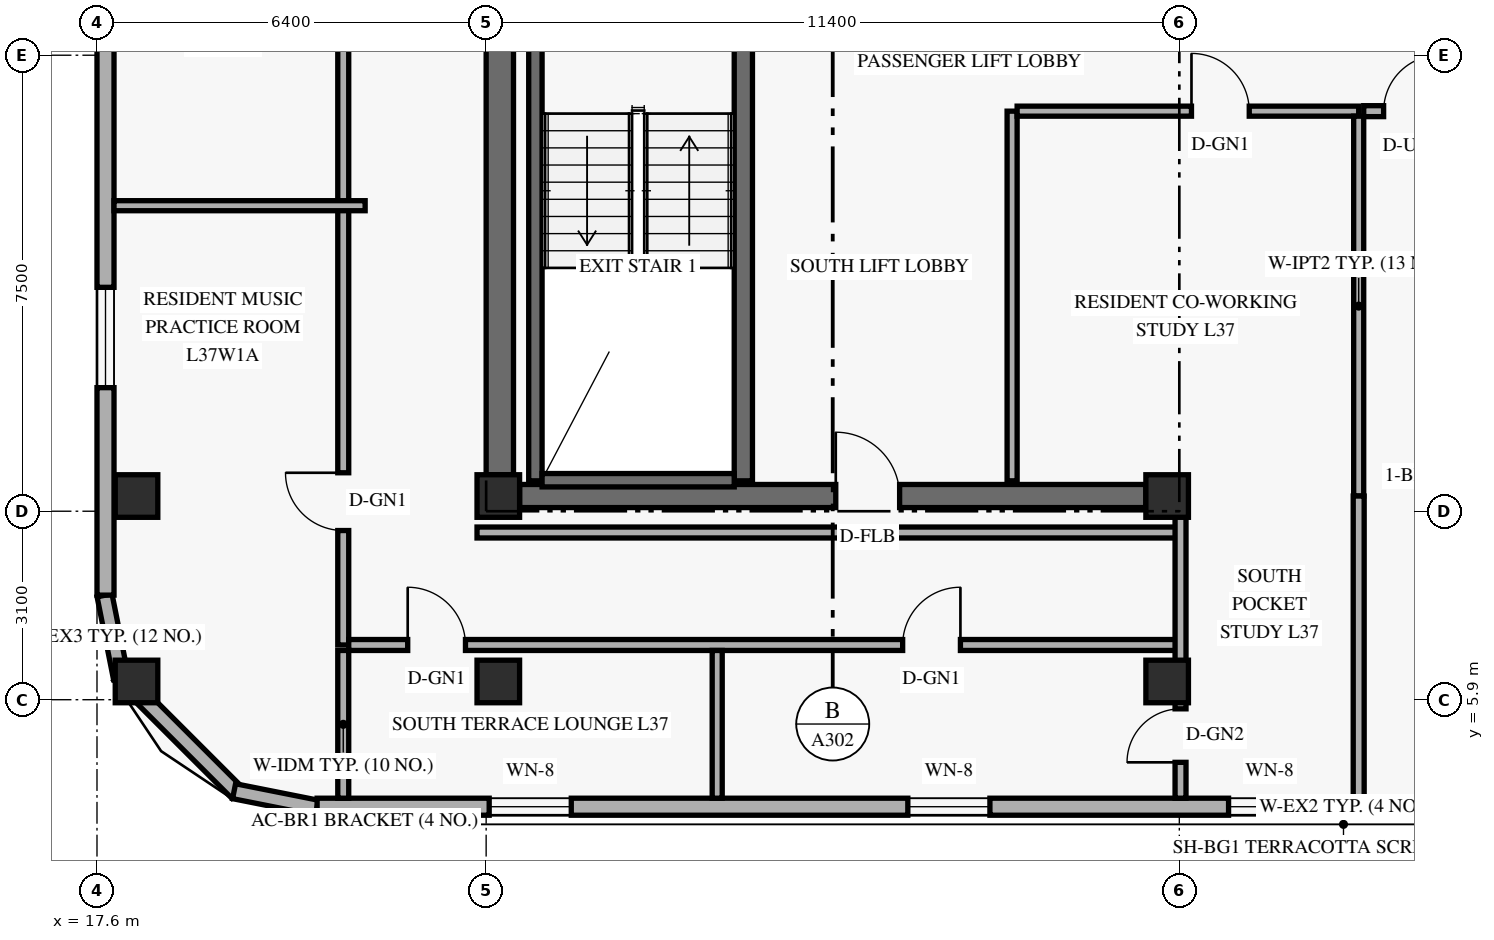
"""IFC4 building model, lengths in metres.
Left out: names, types, materials, properties, quantities, classifications, styles, units other than length and angle.
Written with IfcOpenShell. Run it as: python <this file> out.ifc"""

import sys

from ifc_helpers import new_model, si_unit, direction, frame, frame_2d, origin, origin_2d, place, context, subcontext, project, spatial, rectangle, extrude, element, fill, save


model = new_model("IFC4")
c1 = context("Model", 3, precision=1e-05, world=origin(), true_north=direction((0.0, 1.0)))
c2 = subcontext(c1, "Body", "Model", "MODEL_VIEW")
j1 = project(units=[si_unit("LENGTHUNIT", "METRE"), si_unit("PLANEANGLEUNIT", "RADIAN")], contexts=[c1])
p1 = place(None, origin())
s1 = spatial("IfcSite", under=j1, at=p1, CompositionType="ELEMENT")
p2 = place(p1, origin())
s2 = spatial("IfcBuilding", under=s1, at=p2, CompositionType="ELEMENT")
p3 = place(p2, frame((0.0, 0.0, 144.6)))
s3 = spatial("IfcBuildingStorey", under=s2, at=p3, CompositionType="ELEMENT", Elevation=144.6)
p4 = place(p3, frame((24.225, 9.6, 0.0), z_axis=(0.0, 0.0, 1.0), x_axis=(0.0, 1.0, 0.0)))
e1 = element("IfcWall", 1, at=p4, inside=s3, PredefinedType="SHEAR", context=c2, shape_type="SweptSolid", body=[
    extrude(rectangle(XDim=7.6, YDim=0.45, at=frame_2d((3.8, 0.0))), origin(), (0.0, 0.0, 1.0), 2.748),
])
p5 = place(p3, frame((24.55, 9.25, 0.0), z_axis=(0.0, 0.0, 1.0), x_axis=(1.0, 0.0, 0.0)))
e2 = element("IfcWall", 2, at=p5, inside=s3, PredefinedType="SHEAR", context=c2, shape_type="SweptSolid", body=[
    extrude(rectangle(XDim=10.3, YDim=0.38, at=frame_2d((5.15, 0.0))), origin(), (0.0, 0.0, 1.0), 3.36),
])
p6 = place(p5, frame((5.2, 0.0, 0.0)))
e3 = element("IfcOpeningElement", 3, at=p6, cuts=e2, PredefinedType="OPENING", context=c2, shape_type="SweptSolid", body=[
    extrude(rectangle(XDim=1.05, YDim=2.15, at=frame_2d((0.525, 1.075))), frame((0.0, 0.2, 0.0), z_axis=(0.0, -1.0, 0.0), x_axis=(1.0, 0.0, 0.0)), (0.0, 0.0, 1.0), 0.4),
])
p7 = place(p3, frame((24.81, 9.5, 0.0), z_axis=(0.0, 0.0, 1.0), x_axis=(0.0, 1.0, 0.0)))
e4 = element("IfcWall", 4, at=p7, inside=s3, PredefinedType="SHEAR", context=c2, shape_type="SweptSolid", body=[
    extrude(rectangle(XDim=7.76, YDim=0.22, at=frame_2d((3.88, 0.0))), origin(), (0.0, 0.0, 1.0), 3.36),
])
p8 = place(p3, frame((28.23, 9.5, 0.0), z_axis=(0.0, 0.0, 1.0), x_axis=(0.0, 1.0, 0.0)))
e5 = element("IfcWall", 5, at=p8, inside=s3, PredefinedType="SHEAR", context=c2, shape_type="SweptSolid", body=[
    extrude(rectangle(XDim=7.76, YDim=0.3, at=frame_2d((3.88, 0.0))), origin(), (0.0, 0.0, 1.0), 3.36),
])
p9 = place(p3, frame((24.92, 9.51, 0.0), z_axis=(0.0, 0.0, 1.0), x_axis=(1.0, 0.0, 0.0)))
e6 = element("IfcWall", 6, at=p9, inside=s3, PredefinedType="SHEAR", context=c2, shape_type="SweptSolid", body=[
    extrude(rectangle(XDim=3.16, YDim=0.22, at=frame_2d((1.58, 0.0))), origin(), (0.0, 0.0, 1.0), 3.36),
])
for number, where, z_axis, x_axis in (
    (7, (18.25, 6.2, 0.0), (0.0, 0.0, 1.0), (1.0, 0.0, 0.0)),
    (8, (18.25, 9.25, 0.0), (0.0, 0.0, 1.0), (1.0, 0.0, 0.0)),
    (9, (24.2, 6.2, 0.0), (0.0, 0.0, 1.0), (1.0, 0.0, 0.0)),
    (10, (24.2, 9.25, 0.0), (0.0, 0.0, 1.0), (1.0, 0.0, 0.0)),
    (11, (35.2, 6.2, 0.0), (0.0, 0.0, 1.0), (1.0, 0.0, 0.0)),
    (12, (35.2, 9.25, 0.0), (0.0, 0.0, 1.0), (1.0, 0.0, 0.0)),
):
    element("IfcColumn", number, at=place(p3, frame(where, z_axis=z_axis, x_axis=x_axis)), inside=s3, PredefinedType="COLUMN", context=c2, shape_type="SweptSolid", body=[
        extrude(rectangle(XDim=0.7, YDim=0.7, at=origin_2d()), origin(), (0.0, 0.0, 1.0), 3.6),
    ])
p10 = place(p3, frame((17.724, 7.616, 0.0), z_axis=(0.0, 0.0, 1.0), x_axis=(0.195135625965, -0.9807762678, 0.0)))
e13 = element("IfcWall", 13, at=p10, inside=s3, PredefinedType="SOLIDWALL", context=c2, shape_type="SweptSolid", body=[
    extrude(rectangle(XDim=1.389, YDim=0.25, at=frame_2d((0.694, 0.0))), origin(), (0.0, 0.0, 1.0), 3.36),
])
p11 = place(p3, frame((17.968, 6.305, 0.0), z_axis=(0.0, 0.0, 1.0), x_axis=(0.707106781187, -0.707106781187, 0.0)))
e14 = element("IfcWall", 14, at=p11, inside=s3, PredefinedType="SOLIDWALL", context=c2, shape_type="SweptSolid", body=[
    extrude(rectangle(XDim=2.739, YDim=0.25, at=frame_2d((1.37, 0.0))), origin(), (0.0, 0.0, 1.0), 3.36),
])
p12 = place(p3, frame((19.854, 4.395, 0.0), z_axis=(0.0, 0.0, 1.0), x_axis=(0.980809899341, -0.19496651342, 0.0)))
e15 = element("IfcWall", 15, at=p12, inside=s3, PredefinedType="SOLIDWALL", context=c2, shape_type="SweptSolid", body=[
    extrude(rectangle(XDim=1.389, YDim=0.25, at=frame_2d((0.694, 0.0))), origin(), (0.0, 0.0, 1.0), 3.36),
])
p13 = place(p3, frame((21.22, 4.14, 0.0), z_axis=(0.0, 0.0, 1.0), x_axis=(1.0, 0.0, 0.0)))
e16 = element("IfcWall", 16, at=p13, inside=s3, PredefinedType="SOLIDWALL", context=c2, shape_type="SweptSolid", body=[
    extrude(rectangle(XDim=33.76, YDim=0.28, at=frame_2d((16.88, 0.0))), origin(), (0.0, 0.0, 1.0), 3.36),
])
p14 = place(p13, frame((2.83, 0.0, 0.85)))
e17 = element("IfcOpeningElement", 17, at=p14, cuts=e16, PredefinedType="OPENING", context=c2, shape_type="SweptSolid", body=[
    extrude(rectangle(XDim=1.35, YDim=1.55, at=frame_2d((0.675, 0.775))), frame((0.0, 0.15, 0.0), z_axis=(0.0, -1.0, 0.0), x_axis=(1.0, 0.0, 0.0)), (0.0, 0.0, 1.0), 0.3),
])
p15 = place(p13, frame((9.715, 0.0, 0.85)))
e18 = element("IfcOpeningElement", 18, at=p15, cuts=e16, PredefinedType="OPENING", context=c2, shape_type="SweptSolid", body=[
    extrude(rectangle(XDim=1.35, YDim=1.55, at=frame_2d((0.675, 0.775))), frame((0.0, 0.15, 0.0), z_axis=(0.0, -1.0, 0.0), x_axis=(1.0, 0.0, 0.0)), (0.0, 0.0, 1.0), 0.3),
])
p16 = place(p13, frame((14.99, 0.0, 0.85)))
e19 = element("IfcOpeningElement", 19, at=p16, cuts=e16, PredefinedType="OPENING", context=c2, shape_type="SweptSolid", body=[
    extrude(rectangle(XDim=1.35, YDim=1.55, at=frame_2d((0.675, 0.775))), frame((0.0, 0.15, 0.0), z_axis=(0.0, -1.0, 0.0), x_axis=(1.0, 0.0, 0.0)), (0.0, 0.0, 1.0), 0.3),
])
p17 = place(p13, frame((19.55, 0.0, 0.85)))
e20 = element("IfcOpeningElement", 20, at=p17, cuts=e16, PredefinedType="OPENING", context=c2, shape_type="SweptSolid", body=[
    extrude(rectangle(XDim=1.35, YDim=1.55, at=frame_2d((0.675, 0.775))), frame((0.0, 0.15, 0.0), z_axis=(0.0, -1.0, 0.0), x_axis=(1.0, 0.0, 0.0)), (0.0, 0.0, 1.0), 0.3),
])
p18 = place(p13, frame((24.375, 0.0, 0.85)))
e21 = element("IfcOpeningElement", 21, at=p18, cuts=e16, PredefinedType="OPENING", context=c2, shape_type="SweptSolid", body=[
    extrude(rectangle(XDim=1.35, YDim=1.55, at=frame_2d((0.675, 0.775))), frame((0.0, 0.15, 0.0), z_axis=(0.0, -1.0, 0.0), x_axis=(1.0, 0.0, 0.0)), (0.0, 0.0, 1.0), 0.3),
])
p19 = place(p13, frame((27.08, 0.0, 0.85)))
e22 = element("IfcOpeningElement", 22, at=p19, cuts=e16, PredefinedType="OPENING", context=c2, shape_type="SweptSolid", body=[
    extrude(rectangle(XDim=1.2, YDim=1.5, at=frame_2d((0.6, 0.75))), frame((0.0, 0.15, 0.0), z_axis=(0.0, -1.0, 0.0), x_axis=(1.0, 0.0, 0.0)), (0.0, 0.0, 1.0), 0.3),
])
p20 = place(p13, frame((30.495, 0.0, 0.85)))
e23 = element("IfcOpeningElement", 23, at=p20, cuts=e16, PredefinedType="OPENING", context=c2, shape_type="SweptSolid", body=[
    extrude(rectangle(XDim=1.35, YDim=1.55, at=frame_2d((0.675, 0.775))), frame((0.0, 0.15, 0.0), z_axis=(0.0, -1.0, 0.0), x_axis=(1.0, 0.0, 0.0)), (0.0, 0.0, 1.0), 0.3),
])
p21 = place(p3, frame((17.74, 40.38, 0.0), z_axis=(0.0, 0.0, 1.0), x_axis=(0.0, -1.0, 0.0)))
e24 = element("IfcWall", 24, at=p21, inside=s3, PredefinedType="SOLIDWALL", context=c2, shape_type="SweptSolid", body=[
    extrude(rectangle(XDim=32.76, YDim=0.28, at=frame_2d((16.38, 0.0))), origin(), (0.0, 0.0, 1.0), 3.36),
])
p22 = place(p21, frame((27.698, 0.0, 0.85)))
e25 = element("IfcOpeningElement", 25, at=p22, cuts=e24, PredefinedType="OPENING", context=c2, shape_type="SweptSolid", body=[
    extrude(rectangle(XDim=1.65, YDim=1.6, at=frame_2d((0.825, 0.8))), frame((0.0, 0.15, 0.0), z_axis=(0.0, -1.0, 0.0), x_axis=(1.0, 0.0, 0.0)), (0.0, 0.0, 1.0), 0.3),
])
p23 = place(p21, frame((18.16, 0.0, 0.85)))
e26 = element("IfcOpeningElement", 26, at=p23, cuts=e24, PredefinedType="OPENING", context=c2, shape_type="SweptSolid", body=[
    extrude(rectangle(XDim=1.65, YDim=1.6, at=frame_2d((0.825, 0.8))), frame((0.0, 0.15, 0.0), z_axis=(0.0, -1.0, 0.0), x_axis=(1.0, 0.0, 0.0)), (0.0, 0.0, 1.0), 0.3),
])
p24 = place(p21, frame((12.275, 0.0, 0.85)))
e27 = element("IfcOpeningElement", 27, at=p24, cuts=e24, PredefinedType="OPENING", context=c2, shape_type="SweptSolid", body=[
    extrude(rectangle(XDim=1.65, YDim=1.6, at=frame_2d((0.825, 0.8))), frame((0.0, 0.15, 0.0), z_axis=(0.0, -1.0, 0.0), x_axis=(1.0, 0.0, 0.0)), (0.0, 0.0, 1.0), 0.3),
])
p25 = place(p21, frame((3.238, 0.0, 0.85)))
e28 = element("IfcOpeningElement", 28, at=p25, cuts=e24, PredefinedType="OPENING", context=c2, shape_type="SweptSolid", body=[
    extrude(rectangle(XDim=1.65, YDim=1.6, at=frame_2d((0.825, 0.8))), frame((0.0, 0.15, 0.0), z_axis=(0.0, -1.0, 0.0), x_axis=(1.0, 0.0, 0.0)), (0.0, 0.0, 1.0), 0.3),
])
p26 = place(p3, frame((32.65, 9.5, 0.0), z_axis=(0.0, 0.0, 1.0), x_axis=(0.0, 1.0, 0.0)))
e29 = element("IfcWall", 29, at=p26, inside=s3, PredefinedType="PARTITIONING", context=c2, shape_type="SweptSolid", body=[
    extrude(rectangle(XDim=6.08, YDim=0.165, at=frame_2d((3.04, 0.0))), origin(), (0.0, 0.0, 1.0), 3.36),
])
p27 = place(p3, frame((32.732, 15.58, 0.0), z_axis=(0.0, 0.0, 1.0), x_axis=(1.0, 0.0, 0.0)))
e30 = element("IfcWall", 30, at=p27, inside=s3, PredefinedType="PARTITIONING", context=c2, shape_type="SweptSolid", body=[
    extrude(rectangle(XDim=5.618, YDim=0.165, at=frame_2d((2.809, 0.0))), origin(), (0.0, 0.0, 1.0), 2.73),
])
p28 = place(p27, frame((2.867, 0.0, 0.0)))
e31 = element("IfcOpeningElement", 31, at=p28, cuts=e30, PredefinedType="OPENING", context=c2, shape_type="SweptSolid", body=[
    extrude(rectangle(XDim=0.95, YDim=2.15, at=frame_2d((0.475, 1.075))), frame((0.0, 0.093, 0.0), z_axis=(0.0, -1.0, 0.0), x_axis=(1.0, 0.0, 0.0)), (0.0, 0.0, 1.0), 0.185),
])
p29 = place(p3, frame((38.35, 9.25, 0.0), z_axis=(0.0, 0.0, 1.0), x_axis=(0.0, 1.0, 0.0)))
e32 = element("IfcWall", 32, at=p29, inside=s3, PredefinedType="PARTITIONING", context=c2, shape_type="SweptSolid", body=[
    extrude(rectangle(XDim=6.248, YDim=0.165, at=frame_2d((3.124, 0.0))), origin(), (0.0, 0.0, 1.0), 2.73),
])
p30 = place(p3, frame((38.433, 15.58, 0.0), z_axis=(0.0, 0.0, 1.0), x_axis=(1.0, 0.0, 0.0)))
e33 = element("IfcWall", 33, at=p30, inside=s3, PredefinedType="STANDARD", context=c2, shape_type="SweptSolid", body=[
    extrude(rectangle(XDim=9.567, YDim=0.18, at=frame_2d((4.784, 0.0))), origin(), (0.0, 0.0, 1.0), 2.73),
])
p31 = place(p30, frame((0.327, 0.0, 0.0)))
e34 = element("IfcOpeningElement", 34, at=p31, cuts=e33, PredefinedType="OPENING", context=c2, shape_type="SweptSolid", body=[
    extrude(rectangle(XDim=0.92, YDim=2.15, at=frame_2d((0.46, 1.075))), frame((0.0, 0.1, 0.0), z_axis=(0.0, -1.0, 0.0), x_axis=(1.0, 0.0, 0.0)), (0.0, 0.0, 1.0), 0.2),
])
p32 = place(p3, frame((21.65, 6.8, 0.0), z_axis=(0.0, 0.0, 1.0), x_axis=(0.0, 1.0, 0.0)))
e35 = element("IfcWall", 35, at=p32, inside=s3, PredefinedType="STANDARD", context=c2, shape_type="SweptSolid", body=[
    extrude(rectangle(XDim=34.4, YDim=0.18, at=frame_2d((17.2, 0.0))), origin(), (0.0, 0.0, 1.0), 2.73),
])
p33 = place(p32, frame((1.883, 0.0, 0.0)))
e36 = element("IfcOpeningElement", 36, at=p33, cuts=e35, PredefinedType="OPENING", context=c2, shape_type="SweptSolid", body=[
    extrude(rectangle(XDim=0.95, YDim=2.15, at=frame_2d((0.475, 1.075))), frame((0.0, 0.1, 0.0), z_axis=(0.0, -1.0, 0.0), x_axis=(1.0, 0.0, 0.0)), (0.0, 0.0, 1.0), 0.2),
])
p34 = place(p32, frame((12.117, 0.0, 0.0)))
e37 = element("IfcOpeningElement", 37, at=p34, cuts=e35, PredefinedType="OPENING", context=c2, shape_type="SweptSolid", body=[
    extrude(rectangle(XDim=0.95, YDim=2.15, at=frame_2d((0.475, 1.075))), frame((0.0, 0.1, 0.0), z_axis=(0.0, -1.0, 0.0), x_axis=(1.0, 0.0, 0.0)), (0.0, 0.0, 1.0), 0.2),
])
p35 = place(p32, frame((22.357, 0.0, 0.0)))
e38 = element("IfcOpeningElement", 38, at=p35, cuts=e35, PredefinedType="OPENING", context=c2, shape_type="SweptSolid", body=[
    extrude(rectangle(XDim=0.95, YDim=2.15, at=frame_2d((0.475, 1.075))), frame((0.0, 0.1, 0.0), z_axis=(0.0, -1.0, 0.0), x_axis=(1.0, 0.0, 0.0)), (0.0, 0.0, 1.0), 0.2),
])
p36 = place(p32, frame((31.792, 0.0, 0.0)))
e39 = element("IfcOpeningElement", 39, at=p36, cuts=e35, PredefinedType="OPENING", context=c2, shape_type="SweptSolid", body=[
    extrude(rectangle(XDim=0.95, YDim=2.15, at=frame_2d((0.475, 1.075))), frame((0.0, 0.1, 0.0), z_axis=(0.0, -1.0, 0.0), x_axis=(1.0, 0.0, 0.0)), (0.0, 0.0, 1.0), 0.2),
])
p37 = place(p3, frame((21.74, 6.8, 0.0), z_axis=(0.0, 0.0, 1.0), x_axis=(1.0, 0.0, 0.0)))
e40 = element("IfcWall", 40, at=p37, inside=s3, PredefinedType="STANDARD", context=c2, shape_type="SweptSolid", body=[
    extrude(rectangle(XDim=13.68, YDim=0.18, at=frame_2d((6.84, 0.0))), origin(), (0.0, 0.0, 1.0), 2.73),
])
p38 = place(p37, frame((0.97, 0.0, 0.0)))
e41 = element("IfcOpeningElement", 41, at=p38, cuts=e40, PredefinedType="OPENING", context=c2, shape_type="SweptSolid", body=[
    extrude(rectangle(XDim=0.95, YDim=2.15, at=frame_2d((0.475, 1.075))), frame((0.0, 0.1, 0.0), z_axis=(0.0, -1.0, 0.0), x_axis=(1.0, 0.0, 0.0)), (0.0, 0.0, 1.0), 0.2),
])
p39 = place(p37, frame((9.11, 0.0, 0.0)))
e42 = element("IfcOpeningElement", 42, at=p39, cuts=e40, PredefinedType="OPENING", context=c2, shape_type="SweptSolid", body=[
    extrude(rectangle(XDim=0.95, YDim=2.15, at=frame_2d((0.475, 1.075))), frame((0.0, 0.1, 0.0), z_axis=(0.0, -1.0, 0.0), x_axis=(1.0, 0.0, 0.0)), (0.0, 0.0, 1.0), 0.2),
])
p40 = place(p3, frame((23.85, 8.65, 0.0), z_axis=(0.0, 0.0, 1.0), x_axis=(1.0, 0.0, 0.0)))
e43 = element("IfcWall", 43, at=p40, inside=s3, PredefinedType="STANDARD", context=c2, shape_type="SweptSolid", body=[
    extrude(rectangle(XDim=11.57, YDim=0.18, at=frame_2d((5.785, 0.0))), origin(), (0.0, 0.0, 1.0), 2.73),
])
p41 = place(p3, frame((21.65, 4.28, 0.0), z_axis=(0.0, 0.0, 1.0), x_axis=(0.0, 1.0, 0.0)))
e44 = element("IfcWall", 44, at=p41, inside=s3, PredefinedType="PARTITIONING", context=c2, shape_type="SweptSolid", body=[
    extrude(rectangle(XDim=2.43, YDim=0.18, at=frame_2d((1.215, 0.0))), origin(), (0.0, 0.0, 1.0), 2.879),
])
p42 = place(p3, frame((35.42, 4.28, 0.0), z_axis=(0.0, 0.0, 1.0), x_axis=(0.0, 1.0, 0.0)))
e45 = element("IfcWall", 45, at=p42, inside=s3, PredefinedType="PARTITIONING", context=c2, shape_type="SweptSolid", body=[
    extrude(rectangle(XDim=4.97, YDim=0.18, at=frame_2d((2.485, 0.0))), origin(), (0.0, 0.0, 1.0), 2.73),
])
p43 = place(p42, frame((0.59, 0.0, 0.0)))
e46 = element("IfcOpeningElement", 46, at=p43, cuts=e45, PredefinedType="OPENING", context=c2, shape_type="SweptSolid", body=[
    extrude(rectangle(XDim=0.88, YDim=2.12, at=frame_2d((0.44, 1.06))), frame((0.0, 0.1, 0.0), z_axis=(0.0, -1.0, 0.0), x_axis=(1.0, 0.0, 0.0)), (0.0, 0.0, 1.0), 0.2),
])
p44 = place(p3, frame((38.35, 4.28, 0.0), z_axis=(0.0, 0.0, 1.0), x_axis=(0.0, 1.0, 0.0)))
e47 = element("IfcWall", 47, at=p44, inside=s3, PredefinedType="PARTITIONING", context=c2, shape_type="SweptSolid", body=[
    extrude(rectangle(XDim=4.97, YDim=0.18, at=frame_2d((2.485, 0.0))), origin(), (0.0, 0.0, 1.0), 2.73),
])
p45 = place(p3, frame((17.88, 14.025, 0.0), z_axis=(0.0, 0.0, 1.0), x_axis=(1.0, 0.0, 0.0)))
e48 = element("IfcWall", 48, at=p45, inside=s3, PredefinedType="PARTITIONING", context=c2, shape_type="SweptSolid", body=[
    extrude(rectangle(XDim=4.13, YDim=0.165, at=frame_2d((2.065, 0.0))), origin(), (0.0, 0.0, 1.0), 2.879),
])
p46 = place(p3, frame((27.8, 4.28, 0.0), z_axis=(0.0, 0.0, 1.0), x_axis=(0.0, 1.0, 0.0)))
e49 = element("IfcWall", 49, at=p46, inside=s3, PredefinedType="PARTITIONING", context=c2, shape_type="SweptSolid", body=[
    extrude(rectangle(XDim=2.43, YDim=0.165, at=frame_2d((1.215, 0.0))), origin(), (0.0, 0.0, 1.0), 2.879),
])
p47 = place(p14, origin())
e50 = element("IfcWindow", 50, at=p47, inside=s3, PartitioningType="SINGLE_PANEL", PredefinedType="WINDOW", context=c2, shape_type="SweptSolid", body=[
    extrude(rectangle(XDim=1.35, YDim=1.55, at=frame_2d((0.675, 0.775))), frame((0.0, 0.03, 0.0), z_axis=(0.0, -1.0, 0.0), x_axis=(1.0, 0.0, 0.0)), (0.0, 0.0, 1.0), 0.06),
])
fill(e17, e50)
p48 = place(p15, origin())
e51 = element("IfcWindow", 51, at=p48, inside=s3, PartitioningType="SINGLE_PANEL", PredefinedType="WINDOW", context=c2, shape_type="SweptSolid", body=[
    extrude(rectangle(XDim=1.35, YDim=1.55, at=frame_2d((0.675, 0.775))), frame((0.0, 0.03, 0.0), z_axis=(0.0, -1.0, 0.0), x_axis=(1.0, 0.0, 0.0)), (0.0, 0.0, 1.0), 0.06),
])
fill(e18, e51)
p49 = place(p16, origin())
e52 = element("IfcWindow", 52, at=p49, inside=s3, PartitioningType="SINGLE_PANEL", PredefinedType="WINDOW", context=c2, shape_type="SweptSolid", body=[
    extrude(rectangle(XDim=1.35, YDim=1.55, at=frame_2d((0.675, 0.775))), frame((0.0, 0.03, 0.0), z_axis=(0.0, -1.0, 0.0), x_axis=(1.0, 0.0, 0.0)), (0.0, 0.0, 1.0), 0.06),
])
fill(e19, e52)
p50 = place(p22, origin())
e53 = element("IfcWindow", 53, at=p50, inside=s3, PartitioningType="SINGLE_PANEL", PredefinedType="WINDOW", context=c2, shape_type="SweptSolid", body=[
    extrude(rectangle(XDim=1.65, YDim=1.6, at=frame_2d((0.825, 0.8))), frame((0.0, 0.03, 0.0), z_axis=(0.0, -1.0, 0.0), x_axis=(1.0, 0.0, 0.0)), (0.0, 0.0, 1.0), 0.06),
])
fill(e25, e53)
p51 = place(p28, origin())
e54 = element("IfcDoor", 54, at=p51, inside=s3, OperationType="SINGLE_SWING_LEFT", PredefinedType="DOOR", context=c2, shape_type="SweptSolid", body=[
    extrude(rectangle(XDim=0.95, YDim=2.15, at=frame_2d((0.475, 1.075))), frame((0.0, 0.025, 0.0), z_axis=(0.0, -1.0, 0.0), x_axis=(1.0, 0.0, 0.0)), (0.0, 0.0, 1.0), 0.05),
])
fill(e31, e54)
p52 = place(p6, origin())
e55 = element("IfcDoor", 55, at=p52, inside=s3, OperationType="SINGLE_SWING_LEFT", PredefinedType="DOOR", context=c2, shape_type="SweptSolid", body=[
    extrude(rectangle(XDim=1.05, YDim=2.15, at=frame_2d((0.525, 1.075))), frame((0.0, 0.025, 0.0), z_axis=(0.0, -1.0, 0.0), x_axis=(1.0, 0.0, 0.0)), (0.0, 0.0, 1.0), 0.05),
])
fill(e3, e55)
p53 = place(p43, origin())
e56 = element("IfcDoor", 56, at=p53, inside=s3, OperationType="SINGLE_SWING_LEFT", PredefinedType="DOOR", context=c2, shape_type="SweptSolid", body=[
    extrude(rectangle(XDim=0.88, YDim=2.12, at=frame_2d((0.44, 1.06))), frame((0.0, 0.025, 0.0), z_axis=(0.0, -1.0, 0.0), x_axis=(1.0, 0.0, 0.0)), (0.0, 0.0, 1.0), 0.05),
])
fill(e46, e56)
p54 = place(p31, origin())
e57 = element("IfcDoor", 57, at=p54, inside=s3, OperationType="SINGLE_SWING_RIGHT", PredefinedType="DOOR", context=c2, shape_type="SweptSolid", body=[
    extrude(rectangle(XDim=0.92, YDim=2.15, at=frame_2d((0.46, 1.075))), frame((0.0, 0.025, 0.0), z_axis=(0.0, -1.0, 0.0), x_axis=(1.0, 0.0, 0.0)), (0.0, 0.0, 1.0), 0.05),
])
fill(e34, e57)
p55 = place(p33, origin())
e58 = element("IfcDoor", 58, at=p55, inside=s3, OperationType="SINGLE_SWING_RIGHT", PredefinedType="DOOR", context=c2, shape_type="SweptSolid", body=[
    extrude(rectangle(XDim=0.95, YDim=2.15, at=frame_2d((0.475, 1.075))), frame((0.0, 0.025, 0.0), z_axis=(0.0, -1.0, 0.0), x_axis=(1.0, 0.0, 0.0)), (0.0, 0.0, 1.0), 0.05),
])
fill(e36, e58)
p56 = place(p38, origin())
e59 = element("IfcDoor", 59, at=p56, inside=s3, OperationType="SINGLE_SWING_LEFT", PredefinedType="DOOR", context=c2, shape_type="SweptSolid", body=[
    extrude(rectangle(XDim=0.95, YDim=2.15, at=frame_2d((0.475, 1.075))), frame((0.0, 0.025, 0.0), z_axis=(0.0, -1.0, 0.0), x_axis=(1.0, 0.0, 0.0)), (0.0, 0.0, 1.0), 0.05),
])
fill(e41, e59)
p57 = place(p39, origin())
e60 = element("IfcDoor", 60, at=p57, inside=s3, OperationType="SINGLE_SWING_RIGHT", PredefinedType="DOOR", context=c2, shape_type="SweptSolid", body=[
    extrude(rectangle(XDim=0.95, YDim=2.15, at=frame_2d((0.475, 1.075))), frame((0.0, 0.025, 0.0), z_axis=(0.0, -1.0, 0.0), x_axis=(1.0, 0.0, 0.0)), (0.0, 0.0, 1.0), 0.05),
])
fill(e42, e60)
save(model, sys.argv[1])
